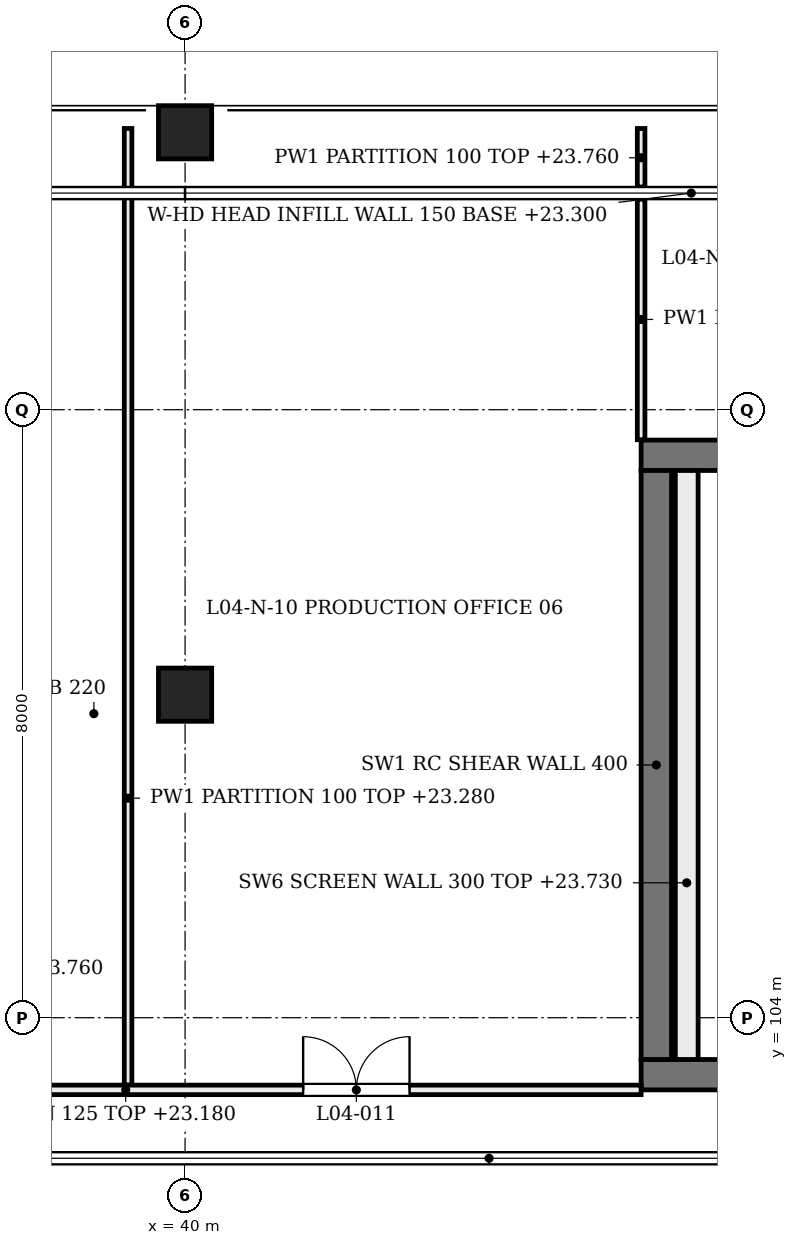
"""IFC4 building model, lengths in metres.
Left out: names, types, materials, properties, quantities, classifications, styles, units other than length and angle.
Written with IfcOpenShell. Run it as: python <this file> out.ifc"""

import sys

from ifc_helpers import new_model, si_unit, direction, frame, frame_2d, origin, origin_2d, place, context, subcontext, project, spatial, rectangle, extrude, element, fill, save


model = new_model("IFC4")
c1 = context("Model", 3, precision=1e-05, world=origin(), true_north=direction((0.0, 1.0)))
c2 = subcontext(c1, "Body", "Model", "MODEL_VIEW")
j1 = project(units=[si_unit("LENGTHUNIT", "METRE"), si_unit("PLANEANGLEUNIT", "RADIAN")], contexts=[c1])
p1 = place(None, origin())
s1 = spatial("IfcSite", under=j1, at=p1, CompositionType="ELEMENT")
p2 = place(p1, origin())
s2 = spatial("IfcBuilding", under=s1, at=p2, CompositionType="ELEMENT")
p3 = place(p2, frame((0.0, 0.0, 19.2)))
s3 = spatial("IfcBuildingStorey", under=s2, at=p3, CompositionType="ELEMENT", Elevation=19.2)
p4 = place(p3, frame((46.0, 103.25, 0.0), z_axis=(0.0, 0.0, 1.0), x_axis=(1.0, 0.0, 0.0)))
e1 = element("IfcWall", 1, at=p4, inside=s3, PredefinedType="SHEAR", context=c2, shape_type="SweptSolid", body=[
    extrude(rectangle(XDim=16.0, YDim=0.4, at=frame_2d((8.0, 0.0))), origin(), (0.0, 0.0, 1.0), 4.58),
])
p5 = place(p4, frame((7.134, 0.0, 0.0)))
e2 = element("IfcOpeningElement", 2, at=p5, cuts=e1, PredefinedType="OPENING", context=c2, shape_type="SweptSolid", body=[
    extrude(rectangle(XDim=1.8, YDim=2.1, at=frame_2d((0.9, 1.05))), frame((0.0, 0.21, 0.0), z_axis=(0.0, -1.0, 0.0), x_axis=(1.0, 0.0, 0.0)), (0.0, 0.0, 1.0), 0.42),
])
p6 = place(p3, frame((46.0, 111.4, 0.0), z_axis=(0.0, 0.0, 1.0), x_axis=(1.0, 0.0, 0.0)))
e3 = element("IfcWall", 3, at=p6, inside=s3, PredefinedType="SHEAR", context=c2, shape_type="SweptSolid", body=[
    extrude(rectangle(XDim=16.0, YDim=0.4, at=frame_2d((8.0, 0.0))), origin(), (0.0, 0.0, 1.0), 4.58),
])
p7 = place(p6, frame((7.312, 0.0, 0.0)))
e4 = element("IfcOpeningElement", 4, at=p7, cuts=e3, PredefinedType="OPENING", context=c2, shape_type="SweptSolid", body=[
    extrude(rectangle(XDim=1.6, YDim=2.2, at=frame_2d((0.8, 1.1))), frame((0.0, 0.21, 0.0), z_axis=(0.0, -1.0, 0.0), x_axis=(1.0, 0.0, 0.0)), (0.0, 0.0, 1.0), 0.42),
])
p8 = place(p3, frame((46.2, 103.45, 0.0), z_axis=(0.0, 0.0, 1.0), x_axis=(0.0, 1.0, 0.0)))
e5 = element("IfcWall", 5, at=p8, inside=s3, PredefinedType="SHEAR", context=c2, shape_type="SweptSolid", body=[
    extrude(rectangle(XDim=7.75, YDim=0.4, at=frame_2d((3.875, 0.0))), origin(), (0.0, 0.0, 1.0), 4.58),
])
for number, where, z_axis, x_axis in (
    (6, (40.0, 108.0, 0.0), (0.0, 0.204, 0.979), (-1.0, 0.0, 0.0)),
    (7, (40.0, 115.4, 0.0), (0.0, 0.204, 0.979), (-1.0, 0.0, 0.0)),
):
    element("IfcColumn", number, at=place(p3, frame(where, z_axis=z_axis, x_axis=x_axis)), inside=s3, PredefinedType="COLUMN", context=c2, shape_type="SweptSolid", body=[
        extrude(rectangle(XDim=0.7, YDim=0.7, at=origin_2d()), origin(), (0.0, 0.0, 1.0), 4.678),
    ])
for number, where, z_axis, x_axis in (
    (8, (40.2, 114.85, 4.1), (0.0, 0.0, 1.0), (1.0, 0.0, 0.0)),
    (9, (32.2, 102.15, 4.1), (0.0, 0.0, 1.0), (1.0, 0.0, 0.0)),
    (10, (40.2, 102.15, 4.1), (0.0, 0.0, 1.0), (1.0, 0.0, 0.0)),
):
    element("IfcWall", number, at=place(p3, frame(where, z_axis=z_axis, x_axis=x_axis)), inside=s3, PredefinedType="SOLIDWALL", context=c2, shape_type="SweptSolid", body=[
        extrude(rectangle(XDim=7.6, YDim=0.15, at=frame_2d((3.8, 0.0))), origin(), (0.0, 0.0, 1.0), 0.48),
    ])
p9 = place(p3, frame((46.0, 111.605, 0.0), z_axis=(0.0, 0.0, 1.0), x_axis=(0.0, 1.0, 0.0)))
e11 = element("IfcWall", 11, at=p9, inside=s3, PredefinedType="PARTITIONING", context=c2, shape_type="SweptSolid", body=[
    extrude(rectangle(XDim=3.165, YDim=0.1, at=frame_2d((1.583, 0.0))), origin(), (0.0, 0.0, 1.0), 4.56),
])
p10 = place(p3, frame((46.0, 114.93, 0.0), z_axis=(0.0, 0.0, 1.0), x_axis=(0.0, 1.0, 0.0)))
e12 = element("IfcWall", 12, at=p10, inside=s3, PredefinedType="PARTITIONING", context=c2, shape_type="SweptSolid", body=[
    extrude(rectangle(XDim=0.77, YDim=0.1, at=frame_2d((0.385, 0.0))), origin(), (0.0, 0.0, 1.0), 4.56),
])
p11 = place(p3, frame((39.25, 103.113, 0.0), z_axis=(0.0, 0.0, 1.0), x_axis=(0.0, 1.0, 0.0)))
e13 = element("IfcWall", 13, at=p11, inside=s3, PredefinedType="PARTITIONING", context=c2, shape_type="SweptSolid", body=[
    extrude(rectangle(XDim=12.587, YDim=0.1, at=frame_2d((6.294, 0.0))), origin(), (0.0, 0.0, 1.0), 4.08),
])
p12 = place(p3, frame((32.438, 103.05, 0.0), z_axis=(0.0, 0.0, 1.0), x_axis=(1.0, 0.0, 0.0)))
e14 = element("IfcWall", 14, at=p12, inside=s3, PredefinedType="PARTITIONING", context=c2, shape_type="SweptSolid", body=[
    extrude(rectangle(XDim=13.562, YDim=0.125, at=frame_2d((6.781, 0.0))), origin(), (0.0, 0.0, 1.0), 3.98),
])
p13 = place(p12, frame((9.116, 0.0, 0.0)))
e15 = element("IfcOpeningElement", 15, at=p13, cuts=e14, PredefinedType="OPENING", context=c2, shape_type="SweptSolid", body=[
    extrude(rectangle(XDim=1.4, YDim=2.2, at=frame_2d((0.7, 1.1))), frame((0.0, 0.073, 0.0), z_axis=(0.0, -1.0, 0.0), x_axis=(1.0, 0.0, 0.0)), (0.0, 0.0, 1.0), 0.145),
])
p14 = place(p3, frame((46.6, 103.45, 0.0), z_axis=(0.0, 0.0, 1.0), x_axis=(0.0, 1.0, 0.0)))
e16 = element("IfcWall", 16, at=p14, inside=s3, PredefinedType="PARTITIONING", context=c2, shape_type="SweptSolid", body=[
    extrude(rectangle(XDim=7.75, YDim=0.3, at=frame_2d((3.875, 0.0))), origin(), (0.0, 0.0, 1.0), 4.53),
])
p15 = place(p13, origin())
e17 = element("IfcDoor", 17, at=p15, inside=s3, OperationType="DOUBLE_DOOR_SINGLE_SWING", PredefinedType="DOOR", context=c2, shape_type="SweptSolid", body=[
    extrude(rectangle(XDim=1.4, YDim=2.2, at=frame_2d((0.7, 1.1))), frame((0.0, 0.025, 0.0), z_axis=(0.0, -1.0, 0.0), x_axis=(1.0, 0.0, 0.0)), (0.0, 0.0, 1.0), 0.05),
])
fill(e15, e17)
save(model, sys.argv[1])
